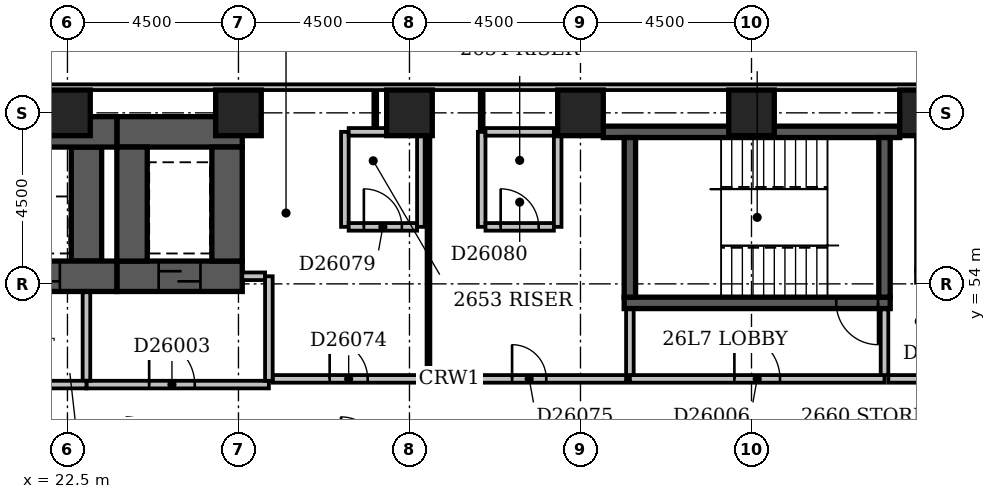
"""IFC4 building model, lengths in metres.
Left out: names, types, materials, properties, quantities, classifications, styles, units other than length and angle.
Written with IfcOpenShell. Run it as: python <this file> out.ifc"""

import sys

from ifc_helpers import new_model, si_unit, direction, frame, frame_2d, origin, origin_2d, place, context, subcontext, project, spatial, rectangle, extrude, element, fill, save


model = new_model("IFC4")
c1 = context("Model", 3, precision=1e-05, world=origin(), true_north=direction((0.0, 1.0)))
c2 = subcontext(c1, "Body", "Model", "MODEL_VIEW")
j1 = project(units=[si_unit("LENGTHUNIT", "METRE"), si_unit("PLANEANGLEUNIT", "RADIAN")], contexts=[c1])
p1 = place(None, origin())
s1 = spatial("IfcSite", under=j1, at=p1, CompositionType="ELEMENT")
p2 = place(p1, origin())
s2 = spatial("IfcBuilding", under=s1, at=p2, CompositionType="ELEMENT")
p3 = place(p2, frame((0.0, 0.0, 104.6)))
s3 = spatial("IfcBuildingStorey", under=s2, at=p3, CompositionType="ELEMENT", Elevation=104.6)
p4 = place(p3, frame((7.35, 54.2, -0.3), z_axis=(0.0, 0.0, 1.0), x_axis=(1.0, 0.0, 0.0)))
e1 = element("IfcWall", 1, at=p4, inside=s3, PredefinedType="SHEAR", context=c2, shape_type="SweptSolid", body=[
    extrude(rectangle(XDim=16.45, YDim=0.8, at=frame_2d((8.225, 0.0))), origin(), (0.0, 0.0, 1.0), 3.45),
])
p5 = place(p4, frame((1.35, 0.0, 0.3)))
e2 = element("IfcOpeningElement", 2, at=p5, cuts=e1, PredefinedType="OPENING", context=c2, shape_type="SweptSolid", body=[
    extrude(rectangle(XDim=1.1, YDim=2.1, at=frame_2d((0.55, 1.05))), frame((0.0, 0.412, 0.0), z_axis=(0.0, -1.0, 0.0), x_axis=(1.0, 0.0, 0.0)), (0.0, 0.0, 1.0), 0.824),
])
p6 = place(p4, frame((3.85, 0.0, 0.3)))
e3 = element("IfcOpeningElement", 3, at=p6, cuts=e1, PredefinedType="OPENING", context=c2, shape_type="SweptSolid", body=[
    extrude(rectangle(XDim=1.1, YDim=2.1, at=frame_2d((0.55, 1.05))), frame((0.0, 0.412, 0.0), z_axis=(0.0, -1.0, 0.0), x_axis=(1.0, 0.0, 0.0)), (0.0, 0.0, 1.0), 0.824),
])
p7 = place(p4, frame((6.35, 0.0, 0.3)))
e4 = element("IfcOpeningElement", 4, at=p7, cuts=e1, PredefinedType="OPENING", context=c2, shape_type="SweptSolid", body=[
    extrude(rectangle(XDim=1.1, YDim=2.1, at=frame_2d((0.55, 1.05))), frame((0.0, 0.412, 0.0), z_axis=(0.0, -1.0, 0.0), x_axis=(1.0, 0.0, 0.0)), (0.0, 0.0, 1.0), 0.824),
])
p8 = place(p4, frame((8.85, 0.0, 0.3)))
e5 = element("IfcOpeningElement", 5, at=p8, cuts=e1, PredefinedType="OPENING", context=c2, shape_type="SweptSolid", body=[
    extrude(rectangle(XDim=1.1, YDim=2.1, at=frame_2d((0.55, 1.05))), frame((0.0, 0.412, 0.0), z_axis=(0.0, -1.0, 0.0), x_axis=(1.0, 0.0, 0.0)), (0.0, 0.0, 1.0), 0.824),
])
p9 = place(p4, frame((11.35, 0.0, 0.3)))
e6 = element("IfcOpeningElement", 6, at=p9, cuts=e1, PredefinedType="OPENING", context=c2, shape_type="SweptSolid", body=[
    extrude(rectangle(XDim=1.1, YDim=2.1, at=frame_2d((0.55, 1.05))), frame((0.0, 0.412, 0.0), z_axis=(0.0, -1.0, 0.0), x_axis=(1.0, 0.0, 0.0)), (0.0, 0.0, 1.0), 0.824),
])
p10 = place(p4, frame((13.85, 0.0, 0.3)))
e7 = element("IfcOpeningElement", 7, at=p10, cuts=e1, PredefinedType="OPENING", context=c2, shape_type="SweptSolid", body=[
    extrude(rectangle(XDim=1.1, YDim=2.1, at=frame_2d((0.55, 1.05))), frame((0.0, 0.412, 0.0), z_axis=(0.0, -1.0, 0.0), x_axis=(1.0, 0.0, 0.0)), (0.0, 0.0, 1.0), 0.824),
])
p11 = place(p3, frame((7.35, 58.0, -0.3), z_axis=(0.0, 0.0, 1.0), x_axis=(1.0, 0.0, 0.0)))
e8 = element("IfcWall", 8, at=p11, inside=s3, PredefinedType="SHEAR", context=c2, shape_type="SweptSolid", body=[
    extrude(rectangle(XDim=16.45, YDim=0.8, at=frame_2d((8.225, 0.0))), origin(), (0.0, 0.0, 1.0), 3.45),
])
p12 = place(p3, frame((23.0, 54.6, -0.3), z_axis=(0.0, 0.0, 1.0), x_axis=(0.0, 1.0, 0.0)))
e9 = element("IfcWall", 9, at=p12, inside=s3, PredefinedType="SHEAR", context=c2, shape_type="SweptSolid", body=[
    extrude(rectangle(XDim=3.0, YDim=0.8, at=frame_2d((1.5, 0.0))), origin(), (0.0, 0.0, 1.0), 3.45),
])
p13 = place(p3, frame((23.8, 54.2, -0.3), z_axis=(0.0, 0.0, 1.0), x_axis=(1.0, 0.0, 0.0)))
e10 = element("IfcWall", 10, at=p13, inside=s3, PredefinedType="SHEAR", context=c2, shape_type="SweptSolid", body=[
    extrude(rectangle(XDim=3.3, YDim=0.8, at=frame_2d((1.65, 0.0))), origin(), (0.0, 0.0, 1.0), 3.45),
])
p14 = place(p13, frame((1.1, 0.0, 0.3)))
e11 = element("IfcOpeningElement", 11, at=p14, cuts=e10, PredefinedType="OPENING", context=c2, shape_type="SweptSolid", body=[
    extrude(rectangle(XDim=1.1, YDim=2.1, at=frame_2d((0.55, 1.05))), frame((0.0, 0.412, 0.0), z_axis=(0.0, -1.0, 0.0), x_axis=(1.0, 0.0, 0.0)), (0.0, 0.0, 1.0), 0.824),
])
p15 = place(p3, frame((23.8, 58.0, -0.3), z_axis=(0.0, 0.0, 1.0), x_axis=(1.0, 0.0, 0.0)))
e12 = element("IfcWall", 12, at=p15, inside=s3, PredefinedType="SHEAR", context=c2, shape_type="SweptSolid", body=[
    extrude(rectangle(XDim=3.3, YDim=0.8, at=frame_2d((1.65, 0.0))), origin(), (0.0, 0.0, 1.0), 3.45),
])
for number, where, z_axis, x_axis in (
    (13, (24.2, 54.6, -0.3), (0.0, 0.0, 1.0), (0.0, 1.0, 0.0)),
    (14, (26.7, 54.6, -0.3), (0.0, 0.0, 1.0), (0.0, 1.0, 0.0)),
):
    element("IfcWall", number, at=place(p3, frame(where, z_axis=z_axis, x_axis=x_axis)), inside=s3, PredefinedType="SHEAR", context=c2, shape_type="SweptSolid", body=[
        extrude(rectangle(XDim=3.0, YDim=0.8, at=frame_2d((1.5, 0.0))), origin(), (0.0, 0.0, 1.0), 3.45),
    ])
p16 = place(p3, frame((36.6, 58.0, -0.3), z_axis=(0.0, 0.0, 1.0), x_axis=(1.0, 0.0, 0.0)))
e15 = element("IfcWall", 15, at=p16, inside=s3, PredefinedType="SHEAR", context=c2, shape_type="SweptSolid", body=[
    extrude(rectangle(XDim=7.8, YDim=0.3, at=frame_2d((3.9, 0.0))), origin(), (0.0, 0.0, 1.0), 3.45),
])
p17 = place(p3, frame((37.15, 53.5, -0.3), z_axis=(0.0, 0.0, 1.0), x_axis=(1.0, 0.0, 0.0)))
e16 = element("IfcWall", 16, at=p17, inside=s3, PredefinedType="SHEAR", context=c2, shape_type="SweptSolid", body=[
    extrude(rectangle(XDim=7.0, YDim=0.3, at=frame_2d((3.5, 0.0))), origin(), (0.0, 0.0, 1.0), 3.45),
])
p18 = place(p17, frame((5.58, 0.0, 0.3)))
e17 = element("IfcOpeningElement", 17, at=p18, cuts=e16, PredefinedType="OPENING", context=c2, shape_type="SweptSolid", body=[
    extrude(rectangle(XDim=1.1, YDim=2.1, at=frame_2d((0.55, 1.05))), frame((0.0, 0.162, 0.0), z_axis=(0.0, -1.0, 0.0), x_axis=(1.0, 0.0, 0.0)), (0.0, 0.0, 1.0), 0.324),
])
for number, where, z_axis, x_axis in (
    (18, (37.3, 53.65, -0.3), (0.0, 0.0, 1.0), (0.0, 1.0, 0.0)),
    (19, (44.0, 53.65, -0.3), (0.0, 0.0, 1.0), (0.0, 1.0, 0.0)),
):
    element("IfcWall", number, at=place(p3, frame(where, z_axis=z_axis, x_axis=x_axis)), inside=s3, PredefinedType="SHEAR", context=c2, shape_type="SweptSolid", body=[
        extrude(rectangle(XDim=4.2, YDim=0.3, at=frame_2d((2.1, 0.0))), origin(), (0.0, 0.0, 1.0), 3.45),
    ])
p19 = place(p3, frame((45.0, 54.35, -0.3), z_axis=(0.0, 0.0, 1.0), x_axis=(0.0, 1.0, 0.0)))
e20 = element("IfcWall", 20, at=p19, inside=s3, PredefinedType="SHEAR", context=c2, shape_type="SweptSolid", body=[
    extrude(rectangle(XDim=3.5, YDim=0.3, at=frame_2d((1.75, 0.0))), origin(), (0.0, 0.0, 1.0), 3.45),
])
for number, where, z_axis, x_axis in (
    (21, (22.5, 58.5, -0.3), (0.0, 0.0, 1.0), (1.0, 0.0, 0.0)),
    (22, (27.0, 58.5, -0.3), (0.0, 0.0, 1.0), (1.0, 0.0, 0.0)),
    (23, (31.5, 58.5, -0.3), (0.0, 0.0, 1.0), (1.0, 0.0, 0.0)),
    (24, (36.0, 58.5, -0.3), (0.0, 0.0, 1.0), (1.0, 0.0, 0.0)),
    (25, (40.5, 58.5, -0.3), (0.0, 0.0, 1.0), (1.0, 0.0, 0.0)),
    (26, (45.0, 58.5, -0.3), (0.0, 0.0, 1.0), (1.0, 0.0, 0.0)),
):
    element("IfcColumn", number, at=place(p3, frame(where, z_axis=z_axis, x_axis=x_axis)), inside=s3, PredefinedType="COLUMN", context=c2, shape_type="SweptSolid", body=[
        extrude(rectangle(XDim=1.2, YDim=1.2, at=origin_2d()), origin(), (0.0, 0.0, 1.0), 3.45),
    ])
p20 = place(p3, frame((68.1, 59.175, 0.0), z_axis=(0.0, 0.0, 1.0), x_axis=(-1.0, 0.0, 0.0)))
e27 = element("IfcWall", 27, at=p20, inside=s3, PredefinedType="STANDARD", context=c2, shape_type="SweptSolid", body=[
    extrude(rectangle(XDim=68.85, YDim=0.15, at=frame_2d((34.425, 0.0))), origin(), (0.0, 0.0, 1.0), 2.5),
])
p21 = place(p20, frame((1.65, 0.0, 0.6)))
e28 = element("IfcOpeningElement", 28, at=p21, cuts=e27, PredefinedType="OPENING", context=c2, shape_type="SweptSolid", body=[
    extrude(rectangle(XDim=2.4, YDim=1.8, at=frame_2d((1.2, 0.9))), frame((0.0, 0.087, 0.0), z_axis=(0.0, -1.0, 0.0), x_axis=(1.0, 0.0, 0.0)), (0.0, 0.0, 1.0), 0.174),
])
p22 = place(p20, frame((5.908, 0.0, 0.6)))
e29 = element("IfcOpeningElement", 29, at=p22, cuts=e27, PredefinedType="OPENING", context=c2, shape_type="SweptSolid", body=[
    extrude(rectangle(XDim=0.6, YDim=1.8, at=frame_2d((0.3, 0.9))), frame((0.0, 0.087, 0.0), z_axis=(0.0, -1.0, 0.0), x_axis=(1.0, 0.0, 0.0)), (0.0, 0.0, 1.0), 0.174),
])
p23 = place(p20, frame((8.166, 0.0, 0.6)))
e30 = element("IfcOpeningElement", 30, at=p23, cuts=e27, PredefinedType="OPENING", context=c2, shape_type="SweptSolid", body=[
    extrude(rectangle(XDim=0.6, YDim=1.8, at=frame_2d((0.3, 0.9))), frame((0.0, 0.087, 0.0), z_axis=(0.0, -1.0, 0.0), x_axis=(1.0, 0.0, 0.0)), (0.0, 0.0, 1.0), 0.174),
])
p24 = place(p3, frame((8.0, 51.35, 0.0), z_axis=(0.0, 0.0, 1.0), x_axis=(1.0, 0.0, 0.0)))
e31 = element("IfcWall", 31, at=p24, inside=s3, PredefinedType="PARTITIONING", context=c2, shape_type="SweptSolid", body=[
    extrude(rectangle(XDim=15.0, YDim=0.2, at=frame_2d((7.5, 0.0))), origin(), (0.0, 0.0, 1.0), 3.15),
])
p25 = place(p24, frame((3.4, 0.0, 0.0)))
e32 = element("IfcOpeningElement", 32, at=p25, cuts=e31, PredefinedType="OPENING", context=c2, shape_type="SweptSolid", body=[
    extrude(rectangle(XDim=1.2, YDim=2.1, at=frame_2d((0.6, 1.05))), frame((0.0, 0.112, 0.0), z_axis=(0.0, -1.0, 0.0), x_axis=(1.0, 0.0, 0.0)), (0.0, 0.0, 1.0), 0.224),
])
p26 = place(p24, frame((9.4, 0.0, 0.0)))
e33 = element("IfcOpeningElement", 33, at=p26, cuts=e31, PredefinedType="OPENING", context=c2, shape_type="SweptSolid", body=[
    extrude(rectangle(XDim=1.2, YDim=2.1, at=frame_2d((0.6, 1.05))), frame((0.0, 0.112, 0.0), z_axis=(0.0, -1.0, 0.0), x_axis=(1.0, 0.0, 0.0)), (0.0, 0.0, 1.0), 0.224),
])
p27 = place(p3, frame((23.0, 51.45, 0.0), z_axis=(0.0, 0.0, 1.0), x_axis=(0.0, 1.0, 0.0)))
e34 = element("IfcWall", 34, at=p27, inside=s3, PredefinedType="PARTITIONING", context=c2, shape_type="SweptSolid", body=[
    extrude(rectangle(XDim=2.33, YDim=0.2, at=frame_2d((1.165, 0.0))), origin(), (0.0, 0.0, 1.0), 3.15),
])
p28 = place(p3, frame((23.0, 51.35, 0.0), z_axis=(0.0, 0.0, 1.0), x_axis=(1.0, 0.0, 0.0)))
e35 = element("IfcWall", 35, at=p28, inside=s3, PredefinedType="PARTITIONING", context=c2, shape_type="SweptSolid", body=[
    extrude(rectangle(XDim=4.8, YDim=0.2, at=frame_2d((2.4, 0.0))), origin(), (0.0, 0.0, 1.0), 3.15),
])
p29 = place(p28, frame((1.65, 0.0, 0.0)))
e36 = element("IfcOpeningElement", 36, at=p29, cuts=e35, PredefinedType="OPENING", context=c2, shape_type="SweptSolid", body=[
    extrude(rectangle(XDim=1.2, YDim=2.1, at=frame_2d((0.6, 1.05))), frame((0.0, 0.112, 0.0), z_axis=(0.0, -1.0, 0.0), x_axis=(1.0, 0.0, 0.0)), (0.0, 0.0, 1.0), 0.224),
])
p30 = place(p3, frame((27.8, 51.45, 0.0), z_axis=(0.0, 0.0, 1.0), x_axis=(0.0, 1.0, 0.0)))
e37 = element("IfcWall", 37, at=p30, inside=s3, PredefinedType="PARTITIONING", context=c2, shape_type="SweptSolid", body=[
    extrude(rectangle(XDim=2.75, YDim=0.2, at=frame_2d((1.375, 0.0))), origin(), (0.0, 0.0, 1.0), 3.15),
])
p31 = place(p3, frame((27.1, 54.2, 0.0), z_axis=(0.0, 0.0, 1.0), x_axis=(1.0, 0.0, 0.0)))
e38 = element("IfcWall", 38, at=p31, inside=s3, PredefinedType="PARTITIONING", context=c2, shape_type="SweptSolid", body=[
    extrude(rectangle(XDim=0.6, YDim=0.2, at=frame_2d((0.3, 0.0))), origin(), (0.0, 0.0, 1.0), 3.15),
])
p32 = place(p3, frame((37.3, 51.5, 0.0), z_axis=(0.0, 0.0, 1.0), x_axis=(1.0, 0.0, 0.0)))
e39 = element("IfcWall", 39, at=p32, inside=s3, PredefinedType="PARTITIONING", context=c2, shape_type="SweptSolid", body=[
    extrude(rectangle(XDim=6.7, YDim=0.2, at=frame_2d((3.35, 0.0))), origin(), (0.0, 0.0, 1.0), 3.15),
])
p33 = place(p32, frame((2.75, 0.0, 0.0)))
e40 = element("IfcOpeningElement", 40, at=p33, cuts=e39, PredefinedType="OPENING", context=c2, shape_type="SweptSolid", body=[
    extrude(rectangle(XDim=1.2, YDim=2.1, at=frame_2d((0.6, 1.05))), frame((0.0, 0.112, 0.0), z_axis=(0.0, -1.0, 0.0), x_axis=(1.0, 0.0, 0.0)), (0.0, 0.0, 1.0), 0.224),
])
for number, where, z_axis, x_axis in (
    (41, (44.0, 51.6, 0.0), (0.0, 0.0, 1.0), (0.0, 1.0, 0.0)),
    (42, (37.3, 51.6, 0.0), (0.0, 0.0, 1.0), (0.0, 1.0, 0.0)),
):
    element("IfcWall", number, at=place(p3, frame(where, z_axis=z_axis, x_axis=x_axis)), inside=s3, PredefinedType="PARTITIONING", context=c2, shape_type="SweptSolid", body=[
        extrude(rectangle(XDim=1.73, YDim=0.2, at=frame_2d((0.865, 0.0))), origin(), (0.0, 0.0, 1.0), 3.15),
    ])
p34 = place(p3, frame((27.9, 51.5, 0.0), z_axis=(0.0, 0.0, 1.0), x_axis=(1.0, 0.0, 0.0)))
e43 = element("IfcWall", 43, at=p34, inside=s3, PredefinedType="PARTITIONING", context=c2, shape_type="SweptSolid", body=[
    extrude(rectangle(XDim=9.3, YDim=0.2, at=frame_2d((4.65, 0.0))), origin(), (0.0, 0.0, 1.0), 3.15),
])
p35 = place(p34, frame((1.5, 0.0, 0.0)))
e44 = element("IfcOpeningElement", 44, at=p35, cuts=e43, PredefinedType="OPENING", context=c2, shape_type="SweptSolid", body=[
    extrude(rectangle(XDim=1.0, YDim=2.1, at=frame_2d((0.5, 1.05))), frame((0.0, 0.112, 0.0), z_axis=(0.0, -1.0, 0.0), x_axis=(1.0, 0.0, 0.0)), (0.0, 0.0, 1.0), 0.224),
])
p36 = place(p34, frame((6.3, 0.0, 0.0)))
e45 = element("IfcOpeningElement", 45, at=p36, cuts=e43, PredefinedType="OPENING", context=c2, shape_type="SweptSolid", body=[
    extrude(rectangle(XDim=0.9, YDim=2.1, at=frame_2d((0.45, 1.05))), frame((0.0, 0.112, 0.0), z_axis=(0.0, -1.0, 0.0), x_axis=(1.0, 0.0, 0.0)), (0.0, 0.0, 1.0), 0.224),
])
p37 = place(p3, frame((44.1, 51.5, 0.0), z_axis=(0.0, 0.0, 1.0), x_axis=(1.0, 0.0, 0.0)))
e46 = element("IfcWall", 46, at=p37, inside=s3, PredefinedType="PARTITIONING", context=c2, shape_type="SweptSolid", body=[
    extrude(rectangle(XDim=2.8, YDim=0.2, at=frame_2d((1.4, 0.0))), origin(), (0.0, 0.0, 1.0), 3.15),
])
p38 = place(p37, frame((0.9, 0.0, 0.0)))
e47 = element("IfcOpeningElement", 47, at=p38, cuts=e46, PredefinedType="OPENING", context=c2, shape_type="SweptSolid", body=[
    extrude(rectangle(XDim=1.0, YDim=2.1, at=frame_2d((0.5, 1.05))), frame((0.0, 0.112, 0.0), z_axis=(0.0, -1.0, 0.0), x_axis=(1.0, 0.0, 0.0)), (0.0, 0.0, 1.0), 0.224),
])
p39 = place(p3, frame((32.0, 51.6, 0.0), z_axis=(0.0, 0.0, 1.0), x_axis=(0.0, 1.0, 0.0)))
e48 = element("IfcWall", 48, at=p39, inside=s3, PredefinedType="PARTITIONING", context=c2, shape_type="SweptSolid", body=[
    extrude(rectangle(XDim=6.3, YDim=0.1, at=frame_2d((3.15, 0.0))), origin(), (0.0, 0.0, 1.0), 3.15),
])
p40 = place(p3, frame((29.8, 55.5, 0.0), z_axis=(0.0, 0.0, 1.0), x_axis=(0.0, 1.0, 0.0)))
e49 = element("IfcWall", 49, at=p40, inside=s3, PredefinedType="PARTITIONING", context=c2, shape_type="SweptSolid", body=[
    extrude(rectangle(XDim=2.5, YDim=0.2, at=frame_2d((1.25, 0.0))), origin(), (0.0, 0.0, 1.0), 3.15),
])
p41 = place(p3, frame((29.9, 55.5, 0.0), z_axis=(0.0, 0.0, 1.0), x_axis=(1.0, 0.0, 0.0)))
e50 = element("IfcWall", 50, at=p41, inside=s3, PredefinedType="PARTITIONING", context=c2, shape_type="SweptSolid", body=[
    extrude(rectangle(XDim=1.8, YDim=0.2, at=frame_2d((0.9, 0.0))), origin(), (0.0, 0.0, 1.0), 3.15),
])
p42 = place(p41, frame((0.4, 0.0, 0.0)))
e51 = element("IfcOpeningElement", 51, at=p42, cuts=e50, PredefinedType="OPENING", context=c2, shape_type="SweptSolid", body=[
    extrude(rectangle(XDim=1.0, YDim=2.1, at=frame_2d((0.5, 1.05))), frame((0.0, 0.112, 0.0), z_axis=(0.0, -1.0, 0.0), x_axis=(1.0, 0.0, 0.0)), (0.0, 0.0, 1.0), 0.224),
])
for number, where, z_axis, x_axis in (
    (52, (31.8, 55.5, 0.0), (0.0, 0.0, 1.0), (0.0, 1.0, 0.0)),
    (53, (33.4, 55.5, 0.0), (0.0, 0.0, 1.0), (0.0, 1.0, 0.0)),
):
    element("IfcWall", number, at=place(p3, frame(where, z_axis=z_axis, x_axis=x_axis)), inside=s3, PredefinedType="PARTITIONING", context=c2, shape_type="SweptSolid", body=[
        extrude(rectangle(XDim=2.5, YDim=0.2, at=frame_2d((1.25, 0.0))), origin(), (0.0, 0.0, 1.0), 3.15),
    ])
p43 = place(p3, frame((33.5, 55.5, 0.0), z_axis=(0.0, 0.0, 1.0), x_axis=(1.0, 0.0, 0.0)))
e54 = element("IfcWall", 54, at=p43, inside=s3, PredefinedType="PARTITIONING", context=c2, shape_type="SweptSolid", body=[
    extrude(rectangle(XDim=1.8, YDim=0.2, at=frame_2d((0.9, 0.0))), origin(), (0.0, 0.0, 1.0), 3.15),
])
p44 = place(p43, frame((0.4, 0.0, 0.0)))
e55 = element("IfcOpeningElement", 55, at=p44, cuts=e54, PredefinedType="OPENING", context=c2, shape_type="SweptSolid", body=[
    extrude(rectangle(XDim=1.0, YDim=2.1, at=frame_2d((0.5, 1.05))), frame((0.0, 0.112, 0.0), z_axis=(0.0, -1.0, 0.0), x_axis=(1.0, 0.0, 0.0)), (0.0, 0.0, 1.0), 0.224),
])
p45 = place(p3, frame((35.4, 55.5, 0.0), z_axis=(0.0, 0.0, 1.0), x_axis=(0.0, 1.0, 0.0)))
e56 = element("IfcWall", 56, at=p45, inside=s3, PredefinedType="PARTITIONING", context=c2, shape_type="SweptSolid", body=[
    extrude(rectangle(XDim=2.5, YDim=0.2, at=frame_2d((1.25, 0.0))), origin(), (0.0, 0.0, 1.0), 2.25),
])
p46 = place(p3, frame((29.9, 58.0, 0.0), z_axis=(0.0, 0.0, 1.0), x_axis=(1.0, 0.0, 0.0)))
e57 = element("IfcWall", 57, at=p46, inside=s3, PredefinedType="PARTITIONING", context=c2, shape_type="SweptSolid", body=[
    extrude(rectangle(XDim=1.8, YDim=0.2, at=frame_2d((0.9, 0.0))), origin(), (0.0, 0.0, 1.0), 3.15),
])
p47 = place(p3, frame((33.4, 58.0, 0.0), z_axis=(0.0, 0.0, 1.0), x_axis=(0.0, 1.0, 0.0)))
e58 = element("IfcWall", 58, at=p47, inside=s3, PredefinedType="PARTITIONING", context=c2, shape_type="SweptSolid", body=[
    extrude(rectangle(XDim=1.1, YDim=0.1, at=frame_2d((0.55, 0.0))), origin(), (0.0, 0.0, 1.0), 3.15),
])
p48 = place(p3, frame((33.5, 58.0, 0.0), z_axis=(0.0, 0.0, 1.0), x_axis=(1.0, 0.0, 0.0)))
e59 = element("IfcWall", 59, at=p48, inside=s3, PredefinedType="PARTITIONING", context=c2, shape_type="SweptSolid", body=[
    extrude(rectangle(XDim=1.8, YDim=0.2, at=frame_2d((0.9, 0.0))), origin(), (0.0, 0.0, 1.0), 3.15),
])
p49 = place(p3, frame((30.6, 58.1, 0.0), z_axis=(0.0, 0.0, 1.0), x_axis=(0.0, 1.0, 0.0)))
e60 = element("IfcWall", 60, at=p49, inside=s3, PredefinedType="PARTITIONING", context=c2, shape_type="SweptSolid", body=[
    extrude(rectangle(XDim=1.0, YDim=0.1, at=frame_2d((0.5, 0.0))), origin(), (0.0, 0.0, 1.0), 3.15),
])
p50 = place(p29, origin())
e61 = element("IfcDoor", 61, at=p50, inside=s3, OperationType="SINGLE_SWING_LEFT", PredefinedType="DOOR", context=c2, shape_type="SweptSolid", body=[
    extrude(rectangle(XDim=1.2, YDim=2.1, at=frame_2d((0.6, 1.05))), frame((0.0, 0.025, 0.0), z_axis=(0.0, -1.0, 0.0), x_axis=(1.0, 0.0, 0.0)), (0.0, 0.0, 1.0), 0.05),
])
fill(e36, e61)
p51 = place(p14, origin())
e62 = element("IfcDoor", 62, at=p51, inside=s3, OperationType="SLIDING_TO_LEFT", PredefinedType="DOOR", context=c2, shape_type="SweptSolid", body=[
    extrude(rectangle(XDim=1.1, YDim=2.1, at=frame_2d((0.55, 1.05))), frame((0.0, 0.025, 0.0), z_axis=(0.0, -1.0, 0.0), x_axis=(1.0, 0.0, 0.0)), (0.0, 0.0, 1.0), 0.05),
])
fill(e11, e62)
p52 = place(p10, origin())
e63 = element("IfcDoor", 63, at=p52, inside=s3, OperationType="SLIDING_TO_LEFT", PredefinedType="DOOR", context=c2, shape_type="SweptSolid", body=[
    extrude(rectangle(XDim=1.1, YDim=2.1, at=frame_2d((0.55, 1.05))), frame((0.0, 0.025, 0.0), z_axis=(0.0, -1.0, 0.0), x_axis=(1.0, 0.0, 0.0)), (0.0, 0.0, 1.0), 0.05),
])
fill(e7, e63)
p53 = place(p33, origin())
e64 = element("IfcDoor", 64, at=p53, inside=s3, OperationType="SINGLE_SWING_LEFT", PredefinedType="DOOR", context=c2, shape_type="SweptSolid", body=[
    extrude(rectangle(XDim=1.2, YDim=2.1, at=frame_2d((0.6, 1.05))), frame((0.0, 0.025, 0.0), z_axis=(0.0, -1.0, 0.0), x_axis=(1.0, 0.0, 0.0)), (0.0, 0.0, 1.0), 0.05),
])
fill(e40, e64)
p54 = place(p18, origin())
e65 = element("IfcDoor", 65, at=p54, inside=s3, OperationType="SINGLE_SWING_RIGHT", PredefinedType="DOOR", context=c2, shape_type="SweptSolid", body=[
    extrude(rectangle(XDim=1.1, YDim=2.1, at=frame_2d((0.55, 1.05))), frame((0.0, 0.025, 0.0), z_axis=(0.0, -1.0, 0.0), x_axis=(1.0, 0.0, 0.0)), (0.0, 0.0, 1.0), 0.05),
])
fill(e17, e65)
p55 = place(p35, origin())
e66 = element("IfcDoor", 66, at=p55, inside=s3, OperationType="SINGLE_SWING_LEFT", PredefinedType="DOOR", context=c2, shape_type="SweptSolid", body=[
    extrude(rectangle(XDim=1.0, YDim=2.1, at=frame_2d((0.5, 1.05))), frame((0.0, 0.025, 0.0), z_axis=(0.0, -1.0, 0.0), x_axis=(1.0, 0.0, 0.0)), (0.0, 0.0, 1.0), 0.05),
])
fill(e44, e66)
p56 = place(p36, origin())
e67 = element("IfcDoor", 67, at=p56, inside=s3, OperationType="SINGLE_SWING_LEFT", PredefinedType="DOOR", context=c2, shape_type="SweptSolid", body=[
    extrude(rectangle(XDim=0.9, YDim=2.1, at=frame_2d((0.45, 1.05))), frame((0.0, 0.025, 0.0), z_axis=(0.0, -1.0, 0.0), x_axis=(1.0, 0.0, 0.0)), (0.0, 0.0, 1.0), 0.05),
])
fill(e45, e67)
p57 = place(p42, origin())
e68 = element("IfcDoor", 68, at=p57, inside=s3, OperationType="SINGLE_SWING_LEFT", PredefinedType="DOOR", context=c2, shape_type="SweptSolid", body=[
    extrude(rectangle(XDim=1.0, YDim=2.1, at=frame_2d((0.5, 1.05))), frame((0.0, 0.025, 0.0), z_axis=(0.0, -1.0, 0.0), x_axis=(1.0, 0.0, 0.0)), (0.0, 0.0, 1.0), 0.05),
])
fill(e51, e68)
p58 = place(p44, origin())
e69 = element("IfcDoor", 69, at=p58, inside=s3, OperationType="SINGLE_SWING_LEFT", PredefinedType="DOOR", context=c2, shape_type="SweptSolid", body=[
    extrude(rectangle(XDim=1.0, YDim=2.1, at=frame_2d((0.5, 1.05))), frame((0.0, 0.025, 0.0), z_axis=(0.0, -1.0, 0.0), x_axis=(1.0, 0.0, 0.0)), (0.0, 0.0, 1.0), 0.05),
])
fill(e55, e69)
save(model, sys.argv[1])
